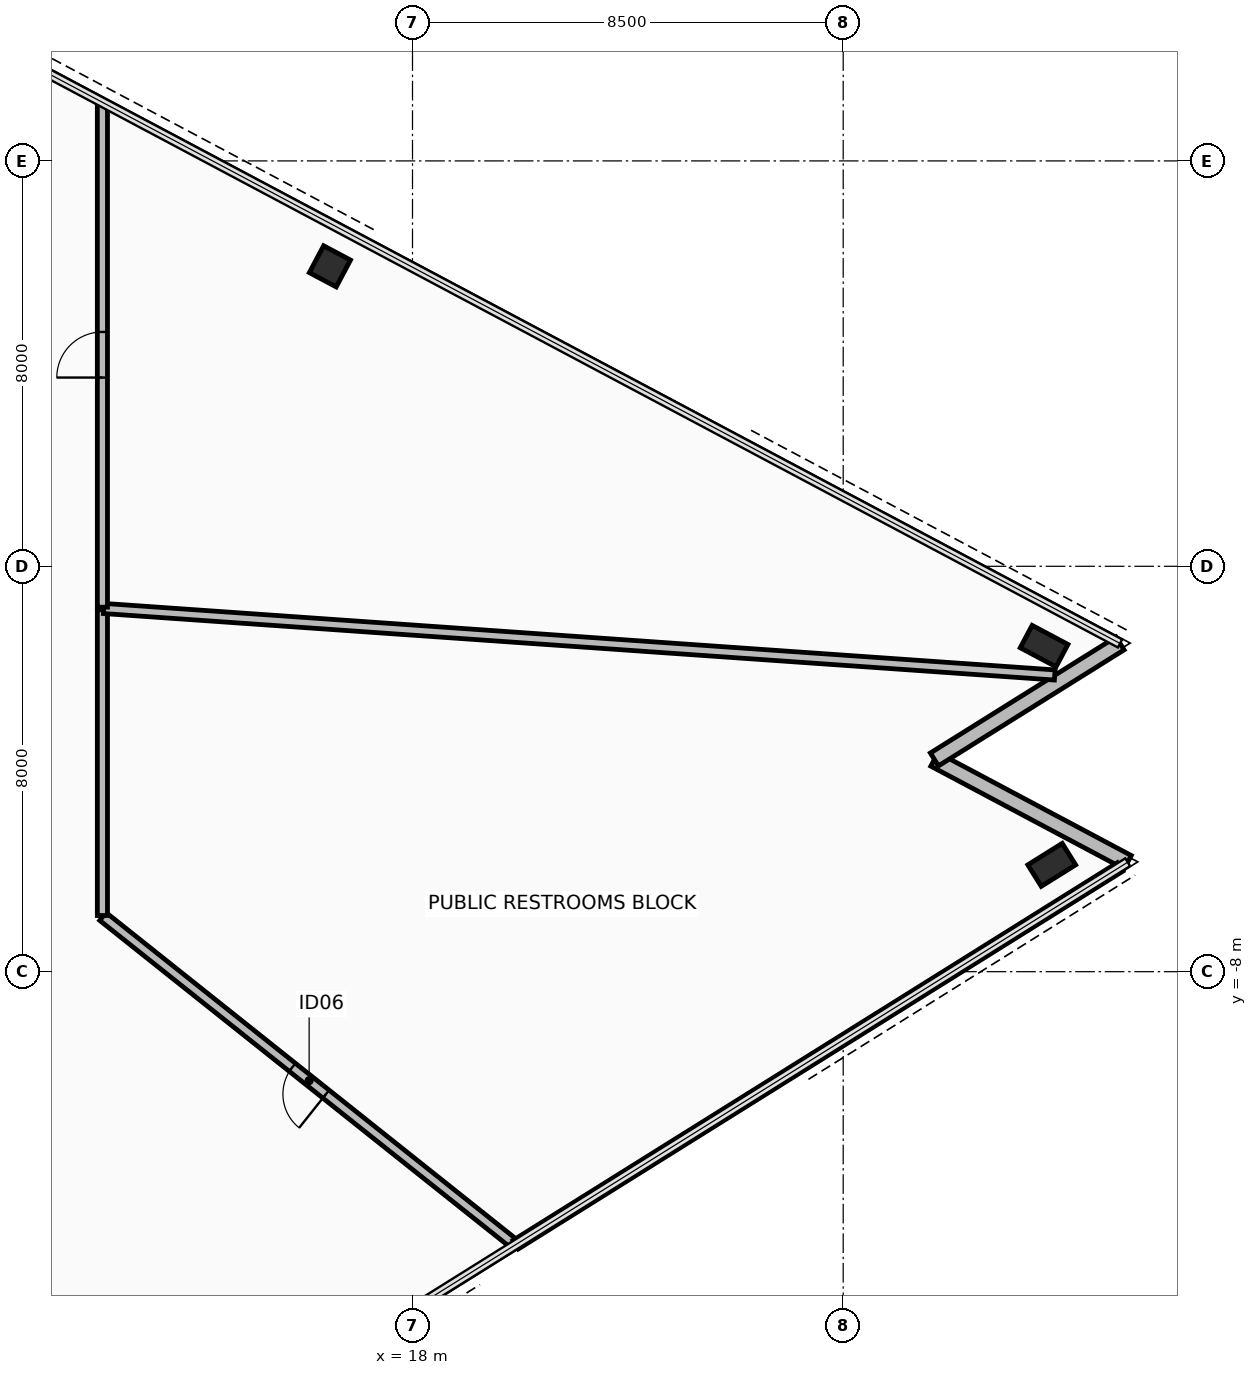
"""IFC4 building model, lengths in metres.
Left out: names, types, materials, properties, quantities, classifications, styles, units other than length and angle.
Written with IfcOpenShell. Run it as: python <this file> out.ifc"""

import sys

from ifc_helpers import new_model, si_unit, direction, frame, frame_2d, origin, origin_2d, place, context, subcontext, project, spatial, rectangle, hollow_rectangle, extrude, element, fill, save


model = new_model("IFC4")
c1 = context("Model", 3, precision=1e-05, world=origin(), true_north=direction((0.0, 1.0)))
c2 = subcontext(c1, "Body", "Model", "MODEL_VIEW")
j1 = project(units=[si_unit("LENGTHUNIT", "METRE"), si_unit("PLANEANGLEUNIT", "RADIAN")], contexts=[c1])
p1 = place(None, origin())
s1 = spatial("IfcSite", under=j1, at=p1, CompositionType="ELEMENT")
p2 = place(p1, origin())
s2 = spatial("IfcBuilding", under=s1, at=p2, CompositionType="ELEMENT")
p3 = place(p2, frame((0.0, 0.0, 156.8)))
s3 = spatial("IfcBuildingStorey", under=s2, at=p3, CompositionType="ELEMENT", Elevation=156.8)
for number, where, z_axis, x_axis in (
    (1, (30.615, -5.892, 0.0), (0.0, 0.0, 1.0), (0.848, 0.53, 0.0)),
    (2, (30.465, -1.575, 0.0), (0.0, 0.0, 1.0), (-0.883, 0.469, 0.0)),
):
    element("IfcColumn", number, at=place(p3, frame(where, z_axis=z_axis, x_axis=x_axis)), inside=s3, PredefinedType="COLUMN", context=c2, shape_type="SweptSolid", body=[
        extrude(hollow_rectangle(XDim=0.5, YDim=0.8, WallThickness=0.04, at=origin_2d()), origin(), (0.0, 0.0, 1.0), 3.6),
    ])
p4 = place(p3, frame((16.37, 5.919, 0.0), z_axis=(0.0, 0.0, 1.0), x_axis=(-0.88294841224, 0.469470021751, 0.0)))
e3 = element("IfcColumn", 3, at=p4, inside=s3, PredefinedType="COLUMN", context=c2, shape_type="SweptSolid", body=[
    extrude(hollow_rectangle(XDim=0.6, YDim=0.6, WallThickness=0.036, at=origin_2d()), origin(), (0.0, 0.0, 1.0), 3.6),
])
p5 = place(p3, frame((32.115, -5.84, 0.0), z_axis=(0.0, 0.0, 1.0), x_axis=(-0.882945167019, 0.469476125099, 0.0)))
e4 = element("IfcWall", 4, at=p5, inside=s3, PredefinedType="STANDARD", context=c2, shape_type="SweptSolid", body=[
    extrude(rectangle(XDim=4.32, YDim=0.3, at=frame_2d((2.16, 0.0))), origin(), (0.0, 0.0, 1.0), 2.705),
])
p6 = place(p3, frame((28.3, -3.812, 0.0), z_axis=(0.0, 0.0, 1.0), x_axis=(0.848042749904, 0.529927819929, 0.0)))
e5 = element("IfcWall", 5, at=p6, inside=s3, PredefinedType="STANDARD", context=c2, shape_type="SweptSolid", body=[
    extrude(rectangle(XDim=4.32, YDim=0.3, at=frame_2d((2.16, 0.0))), origin(), (0.0, 0.0, 1.0), 2.705),
])
p7 = place(p3, frame((20.03, -13.391, 0.0), z_axis=(0.0, 0.0, 1.0), x_axis=(-0.782379652936, 0.622801797261, 0.0)))
e6 = element("IfcWall", 6, at=p7, inside=s3, PredefinedType="PARTITIONING", context=c2, shape_type="SweptSolid", body=[
    extrude(rectangle(XDim=10.405, YDim=0.2, at=frame_2d((5.203, 0.0))), origin(), (0.0, 0.0, 1.0), 2.705),
])
p8 = place(p7, frame((4.777, 0.0, 0.0)))
e7 = element("IfcOpeningElement", 7, at=p8, cuts=e6, PredefinedType="OPENING", context=c2, shape_type="SweptSolid", body=[
    extrude(rectangle(XDim=0.85, YDim=2.1, at=frame_2d((0.425, 1.05))), frame((0.0, 0.11, 0.0), z_axis=(0.0, -1.0, 0.0), x_axis=(1.0, 0.0, 0.0)), (0.0, 0.0, 1.0), 0.22),
])
p9 = place(p3, frame((11.88, -6.891, 0.0), z_axis=(0.0, 0.0, 1.0), x_axis=(0.0, 1.0, 0.0)))
e8 = element("IfcWall", 8, at=p9, inside=s3, PredefinedType="PARTITIONING", context=c2, shape_type="SweptSolid", body=[
    extrude(rectangle(XDim=6.034, YDim=0.2, at=frame_2d((3.017, 0.0))), origin(), (0.0, 0.0, 1.0), 2.855),
])
p10 = place(p3, frame((11.907, -0.833, 0.0), z_axis=(0.0, 0.0, 1.0), x_axis=(0.997563710426, -0.069761333428, 0.0)))
e9 = element("IfcWall", 9, at=p10, inside=s3, PredefinedType="PARTITIONING", context=c2, shape_type="SweptSolid", body=[
    extrude(rectangle(XDim=18.814, YDim=0.2, at=frame_2d((9.407, 0.0))), origin(), (0.0, 0.0, 1.0), 2.705),
])
p11 = place(p3, frame((31.963, -5.935, 0.0), z_axis=(0.0, 0.0, 1.0), x_axis=(-0.848057783803, -0.529903760442, 0.0)))
e10 = element("IfcWall", 10, at=p11, inside=s3, PredefinedType="PARTITIONING", context=c2, shape_type="SweptSolid", body=[
    extrude(rectangle(XDim=14.065, YDim=0.2, at=frame_2d((7.032, 0.0))), origin(), (0.0, 0.0, 1.0), 3.41),
])
p12 = place(p3, frame((7.694, -10.59, 0.0), z_axis=(0.0, 0.0, 1.0), x_axis=(0.587773963439, -0.809025196086, 0.0)))
e11 = element("IfcWall", 11, at=p12, inside=s3, PredefinedType="PARTITIONING", context=c2, shape_type="SweptSolid", body=[
    extrude(rectangle(XDim=8.907, YDim=0.2, at=frame_2d((4.454, 0.0))), origin(), (0.0, 0.0, 1.0), 2.705),
])
p13 = place(p3, frame((11.88, -0.807, 0.0), z_axis=(0.0, 0.0, 1.0), x_axis=(0.0, 1.0, 0.0)))
e12 = element("IfcWall", 12, at=p13, inside=s3, PredefinedType="PARTITIONING", context=c2, shape_type="SweptSolid", body=[
    extrude(rectangle(XDim=9.964, YDim=0.2, at=frame_2d((4.982, 0.0))), origin(), (0.0, 0.0, 1.0), 2.705),
])
p14 = place(p13, frame((4.532, 0.0, 0.0)))
e13 = element("IfcOpeningElement", 13, at=p14, cuts=e12, PredefinedType="OPENING", context=c2, shape_type="SweptSolid", body=[
    extrude(rectangle(XDim=0.9, YDim=2.1, at=frame_2d((0.45, 1.05))), frame((0.0, 0.11, 0.0), z_axis=(0.0, -1.0, 0.0), x_axis=(1.0, 0.0, 0.0)), (0.0, 0.0, 1.0), 0.22),
])
p15 = place(p8, origin())
e14 = element("IfcDoor", 14, at=p15, inside=s3, OperationType="SINGLE_SWING_RIGHT", PredefinedType="DOOR", context=c2, shape_type="SweptSolid", body=[
    extrude(rectangle(XDim=0.85, YDim=2.1, at=frame_2d((0.425, 1.05))), frame((0.0, 0.025, 0.0), z_axis=(0.0, -1.0, 0.0), x_axis=(1.0, 0.0, 0.0)), (0.0, 0.0, 1.0), 0.05),
])
fill(e7, e14)
p16 = place(p14, origin())
e15 = element("IfcDoor", 15, at=p16, inside=s3, OperationType="SINGLE_SWING_LEFT", PredefinedType="DOOR", context=c2, shape_type="SweptSolid", body=[
    extrude(rectangle(XDim=0.9, YDim=2.1, at=frame_2d((0.45, 1.05))), frame((0.0, 0.025, 0.0), z_axis=(0.0, -1.0, 0.0), x_axis=(1.0, 0.0, 0.0)), (0.0, 0.0, 1.0), 0.05),
])
fill(e13, e15)
save(model, sys.argv[1])
